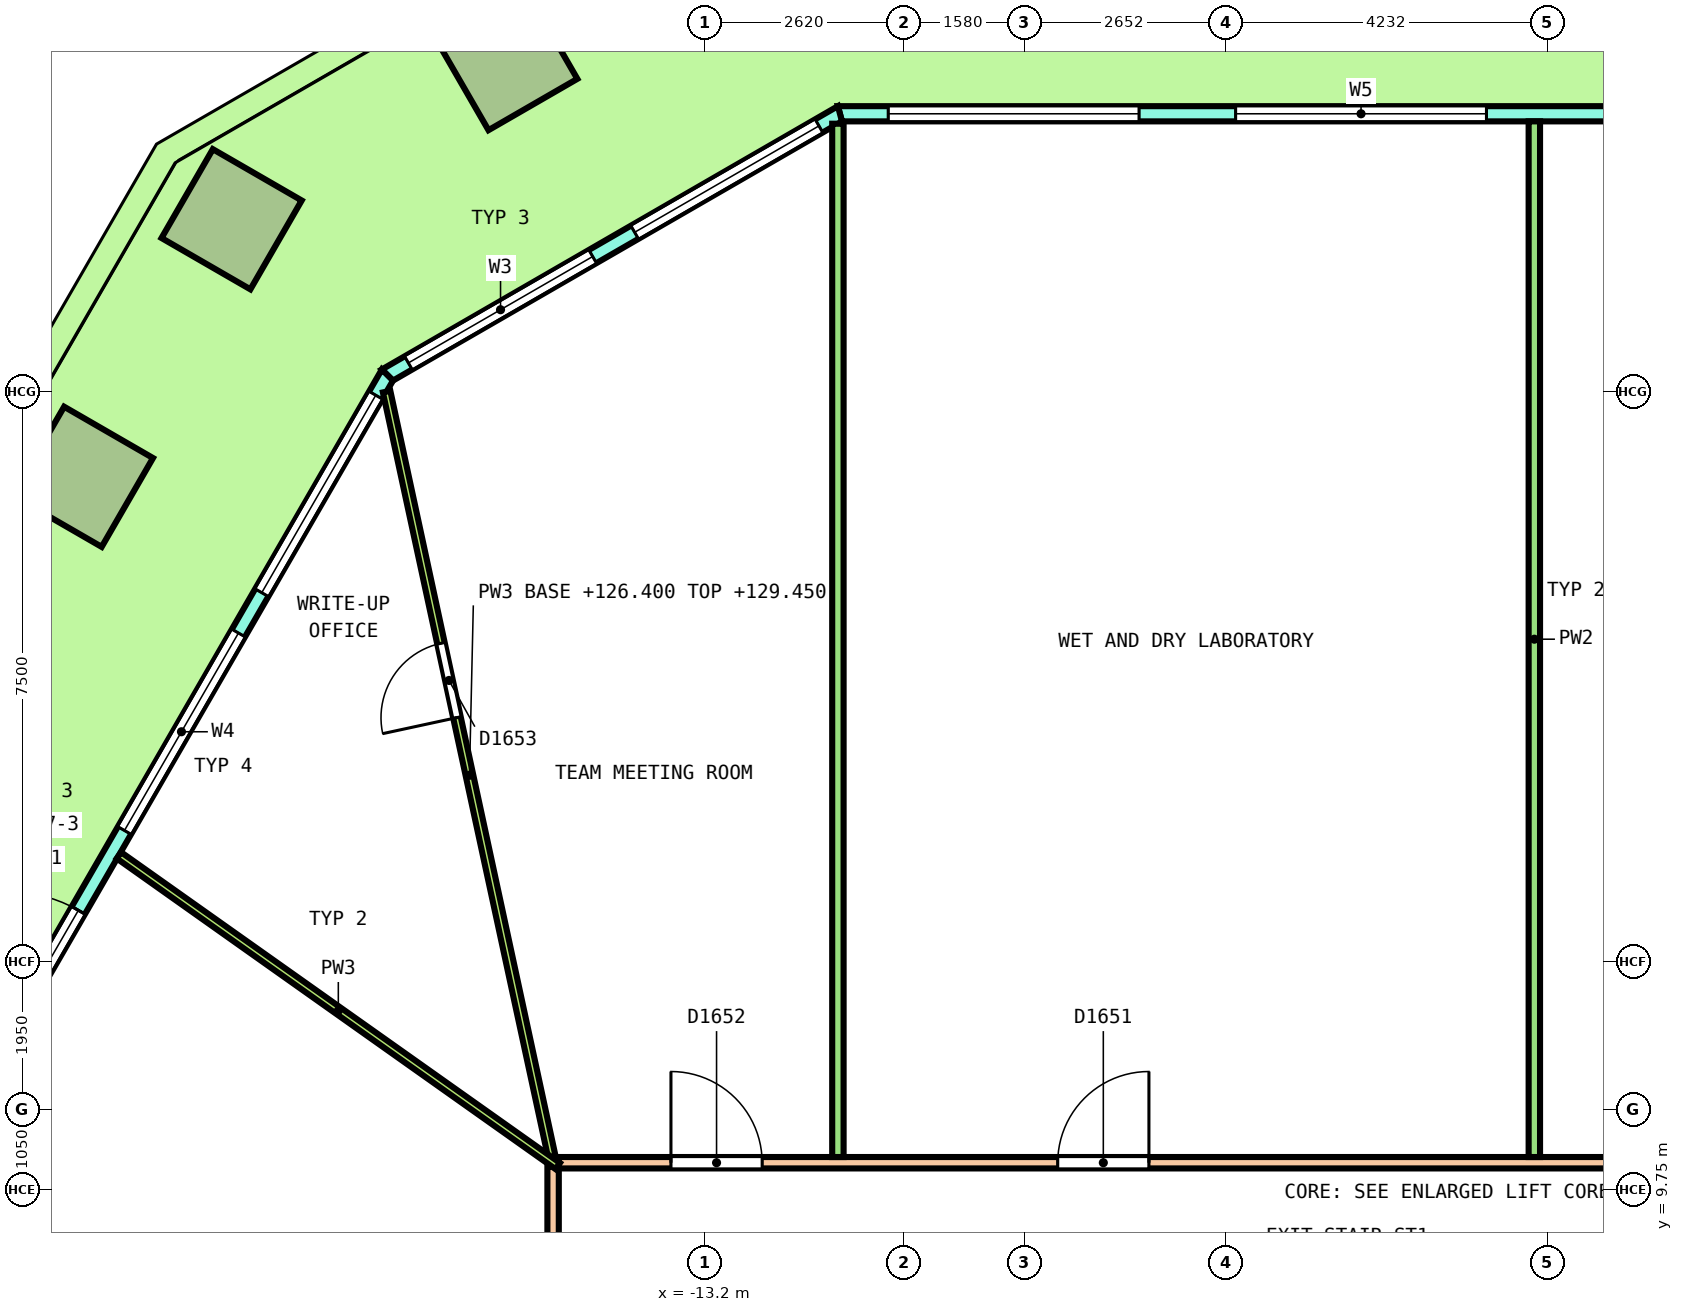
"""IFC4 building model, lengths in metres.
Left out: names, types, materials, properties, quantities, classifications, styles, units other than length and angle.
Written with IfcOpenShell. Run it as: python <this file> out.ifc"""

import sys

from ifc_helpers import new_model, si_unit, direction, frame, frame_2d, origin, origin_2d, place, context, subcontext, project, spatial, polyline, rectangle, outline, extrude, element, fill, save


model = new_model("IFC4")
c1 = context("Model", 3, precision=1e-05, world=origin(), true_north=direction((0.0, 1.0)))
c2 = subcontext(c1, "Body", "Model", "MODEL_VIEW")
j1 = project(units=[si_unit("LENGTHUNIT", "METRE"), si_unit("PLANEANGLEUNIT", "RADIAN")], contexts=[c1])
p1 = place(None, origin())
s1 = spatial("IfcSite", under=j1, at=p1, CompositionType="ELEMENT")
p2 = place(p1, origin())
s2 = spatial("IfcBuilding", under=s1, at=p2, CompositionType="ELEMENT")
p3 = place(p2, frame((0.0, 0.0, 126.4)))
s3 = spatial("IfcBuildingStorey", under=s2, at=p3, CompositionType="ELEMENT", Elevation=126.4)
for number, where, z_axis, x_axis in (
    (1, (-15.803, 24.606, 0.0), (0.0, 0.0, 1.0), (-0.866, -0.5, 0.0)),
    (2, (-19.43, 22.512, 0.0), (0.0, 0.0, 1.0), (-0.5, -0.866, 0.0)),
    (3, (-21.386, 19.124, 0.0), (0.0, 0.0, 1.0), (-0.5, -0.866, 0.0)),
):
    element("IfcColumn", number, at=place(p3, frame(where, z_axis=z_axis, x_axis=x_axis)), inside=s3, PredefinedType="COLUMN", context=c2, shape_type="SweptSolid", body=[
        extrude(rectangle(XDim=1.35, YDim=1.35, at=origin_2d()), origin(), (0.0, 0.0, 1.0), 4.05),
    ])
p4 = place(p3, frame((11.426, 23.9, 0.0), z_axis=(0.0, 0.0, 1.0), x_axis=(-1.0, 0.0, 0.0)))
e4 = element("IfcWall", 4, at=p4, inside=s3, PredefinedType="SOLIDWALL", context=c2, shape_type="SweptSolid", body=[
    extrude(outline(polyline([(-0.027, -0.1), (1.014, -0.1), (2.055, -0.1), (3.097, -0.1), (4.138, -0.1), (5.179, -0.1), (6.22, -0.1), (7.261, -0.1), (8.303, -0.1), (9.344, -0.1), (10.385, -0.1), (11.426, -0.1), (12.468, -0.1), (13.509, -0.1), (14.55, -0.1), (15.591, -0.1), (16.632, -0.1), (17.673, -0.1), (18.715, -0.1), (19.756, -0.1), (20.797, -0.1), (21.838, -0.1), (22.879, -0.1), (22.826, 0.1), (21.789, 0.1), (20.753, 0.1), (19.717, 0.1), (18.68, 0.1), (17.644, 0.1), (16.608, 0.1), (15.572, 0.1), (14.535, 0.1), (13.499, 0.1), (12.463, 0.1), (11.426, 0.1), (10.39, 0.1), (9.354, 0.1), (8.317, 0.1), (7.281, 0.1), (6.245, 0.1), (5.208, 0.1), (4.172, 0.1), (3.136, 0.1), (2.099, 0.1), (1.063, 0.1), (0.027, 0.1), (-0.027, -0.1)])), origin(), (0.0, 0.0, 1.0), 4.1),
])
p5 = place(p4, frame((0.635, 0.0, 0.1)))
e5 = element("IfcOpeningElement", 5, at=p5, cuts=e4, PredefinedType="OPENING", context=c2, shape_type="SweptSolid", body=[
    extrude(rectangle(XDim=3.3, YDim=2.9, at=frame_2d((1.65, 1.45))), frame((0.0, 0.11, 0.0), z_axis=(0.0, -1.0, 0.0), x_axis=(1.0, 0.0, 0.0)), (0.0, 0.0, 1.0), 0.22),
])
p6 = place(p4, frame((5.206, 0.0, 0.1)))
e6 = element("IfcOpeningElement", 6, at=p6, cuts=e4, PredefinedType="OPENING", context=c2, shape_type="SweptSolid", body=[
    extrude(rectangle(XDim=3.3, YDim=2.9, at=frame_2d((1.65, 1.45))), frame((0.0, 0.11, 0.0), z_axis=(0.0, -1.0, 0.0), x_axis=(1.0, 0.0, 0.0)), (0.0, 0.0, 1.0), 0.22),
])
p7 = place(p4, frame((10.526, 0.0, 0.0)))
e7 = element("IfcOpeningElement", 7, at=p7, cuts=e4, PredefinedType="OPENING", context=c2, shape_type="SweptSolid", body=[
    extrude(rectangle(XDim=1.8, YDim=2.4, at=frame_2d((0.9, 1.2))), frame((0.0, 0.11, 0.0), z_axis=(0.0, -1.0, 0.0), x_axis=(1.0, 0.0, 0.0)), (0.0, 0.0, 1.0), 0.22),
])
p8 = place(p4, frame((10.526, 0.0, 2.55)))
e8 = element("IfcOpeningElement", 8, at=p8, cuts=e4, PredefinedType="OPENING", context=c2, shape_type="SweptSolid", body=[
    extrude(rectangle(XDim=1.8, YDim=0.45, at=frame_2d((0.9, 0.225))), frame((0.0, 0.11, 0.0), z_axis=(0.0, -1.0, 0.0), x_axis=(1.0, 0.0, 0.0)), (0.0, 0.0, 1.0), 0.22),
])
p9 = place(p4, frame((14.347, 0.0, 0.1)))
e9 = element("IfcOpeningElement", 9, at=p9, cuts=e4, PredefinedType="OPENING", context=c2, shape_type="SweptSolid", body=[
    extrude(rectangle(XDim=3.3, YDim=2.9, at=frame_2d((1.65, 1.45))), frame((0.0, 0.11, 0.0), z_axis=(0.0, -1.0, 0.0), x_axis=(1.0, 0.0, 0.0)), (0.0, 0.0, 1.0), 0.22),
])
p10 = place(p4, frame((18.917, 0.0, 0.1)))
e10 = element("IfcOpeningElement", 10, at=p10, cuts=e4, PredefinedType="OPENING", context=c2, shape_type="SweptSolid", body=[
    extrude(rectangle(XDim=3.3, YDim=2.9, at=frame_2d((1.65, 1.45))), frame((0.0, 0.11, 0.0), z_axis=(0.0, -1.0, 0.0), x_axis=(1.0, 0.0, 0.0)), (0.0, 0.0, 1.0), 0.22),
])
p11 = place(p3, frame((-11.426, 23.9, 0.0), z_axis=(0.0, 0.0, 1.0), x_axis=(-0.866029458321, -0.49999297727, 0.0)))
e11 = element("IfcWall", 11, at=p11, inside=s3, PredefinedType="SOLIDWALL", context=c2, shape_type="SweptSolid", body=[
    extrude(outline(polyline([(-0.027, -0.1), (1.128, -0.1), (2.282, -0.1), (3.437, -0.1), (4.592, -0.1), (5.747, -0.1), (6.901, -0.1), (6.848, 0.1), (5.711, 0.1), (4.574, 0.1), (3.437, 0.1), (2.301, 0.1), (1.164, 0.1), (0.027, 0.1), (-0.027, -0.1)])), origin(), (0.0, 0.0, 1.0), 4.1),
])
p12 = place(p11, frame((0.319, 0.0, 0.1)))
e12 = element("IfcOpeningElement", 12, at=p12, cuts=e11, PredefinedType="OPENING", context=c2, shape_type="SweptSolid", body=[
    extrude(rectangle(XDim=2.8, YDim=2.9, at=frame_2d((1.4, 1.45))), frame((0.0, 0.11, 0.0), z_axis=(0.0, -1.0, 0.0), x_axis=(1.0, 0.0, 0.0)), (0.0, 0.0, 1.0), 0.22),
])
p13 = place(p11, frame((3.756, 0.0, 0.1)))
e13 = element("IfcOpeningElement", 13, at=p13, cuts=e11, PredefinedType="OPENING", context=c2, shape_type="SweptSolid", body=[
    extrude(rectangle(XDim=2.8, YDim=2.9, at=frame_2d((1.4, 1.45))), frame((0.0, 0.11, 0.0), z_axis=(0.0, -1.0, 0.0), x_axis=(1.0, 0.0, 0.0)), (0.0, 0.0, 1.0), 0.22),
])
p14 = place(p3, frame((-17.38, 20.463, 0.0), z_axis=(0.0, 0.0, 1.0), x_axis=(-0.500000137386, -0.866025324465, 0.0)))
e14 = element("IfcWall", 14, at=p14, inside=s3, PredefinedType="SOLIDWALL", context=c2, shape_type="SweptSolid", body=[
    extrude(outline(polyline([(-0.027, -0.1), (0.979, -0.1), (1.986, -0.1), (2.992, -0.1), (3.999, -0.1), (5.005, -0.1), (6.012, -0.1), (7.018, -0.1), (8.025, -0.1), (9.031, -0.1), (10.038, -0.1), (11.044, -0.1), (12.051, -0.1), (13.057, -0.1), (14.063, -0.1), (15.07, -0.1), (16.076, -0.1), (17.083, -0.1), (18.089, -0.1), (18.036, 0.1), (17.035, 0.1), (16.035, 0.1), (15.034, 0.1), (14.034, 0.1), (13.033, 0.1), (12.033, 0.1), (11.032, 0.1), (10.032, 0.1), (9.031, 0.1), (8.031, 0.1), (7.03, 0.1), (6.03, 0.1), (5.029, 0.1), (4.029, 0.1), (3.028, 0.1), (2.028, 0.1), (1.027, 0.1), (0.027, 0.1), (-0.027, -0.1)])), origin(), (0.0, 0.0, 1.0), 4.1),
])
p15 = place(p14, frame((0.306, 0.0, 0.1)))
e15 = element("IfcOpeningElement", 15, at=p15, cuts=e14, PredefinedType="OPENING", context=c2, shape_type="SweptSolid", body=[
    extrude(rectangle(XDim=3.0, YDim=2.9, at=frame_2d((1.5, 1.45))), frame((0.0, 0.11, 0.0), z_axis=(0.0, -1.0, 0.0), x_axis=(1.0, 0.0, 0.0)), (0.0, 0.0, 1.0), 0.22),
])
p16 = place(p14, frame((3.919, 0.0, 0.1)))
e16 = element("IfcOpeningElement", 16, at=p16, cuts=e14, PredefinedType="OPENING", context=c2, shape_type="SweptSolid", body=[
    extrude(rectangle(XDim=3.0, YDim=2.9, at=frame_2d((1.5, 1.45))), frame((0.0, 0.11, 0.0), z_axis=(0.0, -1.0, 0.0), x_axis=(1.0, 0.0, 0.0)), (0.0, 0.0, 1.0), 0.22),
])
p17 = place(p14, frame((8.131, 0.0, 0.0)))
e17 = element("IfcOpeningElement", 17, at=p17, cuts=e14, PredefinedType="OPENING", context=c2, shape_type="SweptSolid", body=[
    extrude(rectangle(XDim=1.8, YDim=2.4, at=frame_2d((0.9, 1.2))), frame((0.0, 0.11, 0.0), z_axis=(0.0, -1.0, 0.0), x_axis=(1.0, 0.0, 0.0)), (0.0, 0.0, 1.0), 0.22),
])
p18 = place(p14, frame((8.131, 0.0, 2.55)))
e18 = element("IfcOpeningElement", 18, at=p18, cuts=e14, PredefinedType="OPENING", context=c2, shape_type="SweptSolid", body=[
    extrude(rectangle(XDim=1.8, YDim=0.45, at=frame_2d((0.9, 0.225))), frame((0.0, 0.11, 0.0), z_axis=(0.0, -1.0, 0.0), x_axis=(1.0, 0.0, 0.0)), (0.0, 0.0, 1.0), 0.22),
])
p19 = place(p14, frame((11.144, 0.0, 0.1)))
e19 = element("IfcOpeningElement", 19, at=p19, cuts=e14, PredefinedType="OPENING", context=c2, shape_type="SweptSolid", body=[
    extrude(rectangle(XDim=3.0, YDim=2.9, at=frame_2d((1.5, 1.45))), frame((0.0, 0.11, 0.0), z_axis=(0.0, -1.0, 0.0), x_axis=(1.0, 0.0, 0.0)), (0.0, 0.0, 1.0), 0.22),
])
p20 = place(p14, frame((14.756, 0.0, 0.1)))
e20 = element("IfcOpeningElement", 20, at=p20, cuts=e14, PredefinedType="OPENING", context=c2, shape_type="SweptSolid", body=[
    extrude(rectangle(XDim=3.0, YDim=2.9, at=frame_2d((1.5, 1.45))), frame((0.0, 0.11, 0.0), z_axis=(0.0, -1.0, 0.0), x_axis=(1.0, 0.0, 0.0)), (0.0, 0.0, 1.0), 0.22),
])
p21 = place(p3, frame((-15.125, 10.1, 0.0), z_axis=(0.0, 0.0, 1.0), x_axis=(1.0, 0.0, 0.0)))
e21 = element("IfcWall", 21, at=p21, inside=s3, PredefinedType="PARTITIONING", context=c2, shape_type="SweptSolid", body=[
    extrude(rectangle(XDim=30.25, YDim=0.15, at=frame_2d((15.125, 0.0))), origin(), (0.0, 0.0, 1.0), 3.05),
])
p22 = place(p21, frame((16.895, 0.0, 0.0)))
e22 = element("IfcOpeningElement", 22, at=p22, cuts=e21, PredefinedType="OPENING", context=c2, shape_type="SweptSolid", body=[
    extrude(rectangle(XDim=1.2, YDim=2.1, at=frame_2d((0.6, 1.05))), frame((0.0, 0.085, 0.0), z_axis=(0.0, -1.0, 0.0), x_axis=(1.0, 0.0, 0.0)), (0.0, 0.0, 1.0), 0.17),
])
p23 = place(p21, frame((6.564, 0.0, 0.0)))
e23 = element("IfcOpeningElement", 23, at=p23, cuts=e21, PredefinedType="OPENING", context=c2, shape_type="SweptSolid", body=[
    extrude(rectangle(XDim=1.2, YDim=2.1, at=frame_2d((0.6, 1.05))), frame((0.0, 0.085, 0.0), z_axis=(0.0, -1.0, 0.0), x_axis=(1.0, 0.0, 0.0)), (0.0, 0.0, 1.0), 0.17),
])
p24 = place(p21, frame((1.476, 0.0, 0.0)))
e24 = element("IfcOpeningElement", 24, at=p24, cuts=e21, PredefinedType="OPENING", context=c2, shape_type="SweptSolid", body=[
    extrude(rectangle(XDim=1.2, YDim=2.1, at=frame_2d((0.6, 1.05))), frame((0.0, 0.085, 0.0), z_axis=(0.0, -1.0, 0.0), x_axis=(1.0, 0.0, 0.0)), (0.0, 0.0, 1.0), 0.17),
])
p25 = place(p3, frame((-15.2, 0.426, 0.0), z_axis=(0.0, 0.0, 1.0), x_axis=(0.0, 1.0, 0.0)))
e25 = element("IfcWall", 25, at=p25, inside=s3, PredefinedType="PARTITIONING", context=c2, shape_type="SweptSolid", body=[
    extrude(rectangle(XDim=9.624, YDim=0.15, at=frame_2d((4.812, 0.0))), origin(), (0.0, 0.0, 1.0), 3.05),
])
p26 = place(p25, frame((6.951, 0.0, 0.0)))
e26 = element("IfcOpeningElement", 26, at=p26, cuts=e25, PredefinedType="OPENING", context=c2, shape_type="SweptSolid", body=[
    extrude(rectangle(XDim=1.2, YDim=2.1, at=frame_2d((0.6, 1.05))), frame((0.0, 0.085, 0.0), z_axis=(0.0, -1.0, 0.0), x_axis=(1.0, 0.0, 0.0)), (0.0, 0.0, 1.0), 0.17),
])
p27 = place(p3, frame((-2.291, 10.175, 0.0), z_axis=(0.0, 0.0, 1.0), x_axis=(0.0, 1.0, 0.0)))
e27 = element("IfcWall", 27, at=p27, inside=s3, PredefinedType="PARTITIONING", context=c2, shape_type="SweptSolid", body=[
    extrude(rectangle(XDim=13.625, YDim=0.15, at=frame_2d((6.812, 0.0))), origin(), (0.0, 0.0, 1.0), 3.05),
])
p28 = place(p3, frame((-11.453, 10.175, 0.0), z_axis=(0.0, 0.0, 1.0), x_axis=(0.0, 1.0, 0.0)))
e28 = element("IfcWall", 28, at=p28, inside=s3, PredefinedType="PARTITIONING", context=c2, shape_type="SweptSolid", body=[
    extrude(rectangle(XDim=13.594, YDim=0.15, at=frame_2d((6.797, 0.0))), origin(), (0.0, 0.0, 1.0), 3.05),
])
p29 = place(p3, frame((-17.39, 20.245, 0.0), z_axis=(0.0, 0.0, 1.0), x_axis=(0.211012362952, -0.977483392535, 0.0)))
e29 = element("IfcWall", 29, at=p29, inside=s3, PredefinedType="PARTITIONING", context=c2, shape_type="SweptSolid", body=[
    extrude(rectangle(XDim=10.329, YDim=0.1, at=frame_2d((5.164, 0.0))), origin(), (0.0, 0.0, 1.0), 3.05),
])
p30 = place(p29, frame((3.387, 0.0, 0.0)))
e30 = element("IfcOpeningElement", 30, at=p30, cuts=e29, PredefinedType="OPENING", context=c2, shape_type="SweptSolid", body=[
    extrude(rectangle(XDim=1.0, YDim=2.1, at=frame_2d((0.5, 1.05))), frame((0.0, 0.06, 0.0), z_axis=(0.0, -1.0, 0.0), x_axis=(1.0, 0.0, 0.0)), (0.0, 0.0, 1.0), 0.12),
])
p31 = place(p3, frame((-20.912, 14.144, 0.0), z_axis=(0.0, 0.0, 1.0), x_axis=(0.816149265307, -0.577841134516, 0.0)))
e31 = element("IfcWall", 31, at=p31, inside=s3, PredefinedType="PARTITIONING", context=c2, shape_type="SweptSolid", body=[
    extrude(rectangle(XDim=7.074, YDim=0.1, at=frame_2d((3.537, 0.0))), origin(), (0.0, 0.0, 1.0), 3.05),
])
p32 = place(p9, origin())
e32 = element("IfcWindow", 32, at=p32, inside=s3, PartitioningType="SINGLE_PANEL", PredefinedType="WINDOW", context=c2, shape_type="SweptSolid", body=[
    extrude(rectangle(XDim=3.3, YDim=2.9, at=frame_2d((1.65, 1.45))), frame((0.0, 0.03, 0.0), z_axis=(0.0, -1.0, 0.0), x_axis=(1.0, 0.0, 0.0)), (0.0, 0.0, 1.0), 0.06),
])
fill(e9, e32)
p33 = place(p10, origin())
e33 = element("IfcWindow", 33, at=p33, inside=s3, PartitioningType="SINGLE_PANEL", PredefinedType="WINDOW", context=c2, shape_type="SweptSolid", body=[
    extrude(rectangle(XDim=3.3, YDim=2.9, at=frame_2d((1.65, 1.45))), frame((0.0, 0.03, 0.0), z_axis=(0.0, -1.0, 0.0), x_axis=(1.0, 0.0, 0.0)), (0.0, 0.0, 1.0), 0.06),
])
fill(e10, e33)
p34 = place(p12, origin())
e34 = element("IfcWindow", 34, at=p34, inside=s3, PartitioningType="SINGLE_PANEL", PredefinedType="WINDOW", context=c2, shape_type="SweptSolid", body=[
    extrude(rectangle(XDim=2.8, YDim=2.9, at=frame_2d((1.4, 1.45))), frame((0.0, 0.03, 0.0), z_axis=(0.0, -1.0, 0.0), x_axis=(1.0, 0.0, 0.0)), (0.0, 0.0, 1.0), 0.06),
])
fill(e12, e34)
p35 = place(p13, origin())
e35 = element("IfcWindow", 35, at=p35, inside=s3, PartitioningType="SINGLE_PANEL", PredefinedType="WINDOW", context=c2, shape_type="SweptSolid", body=[
    extrude(rectangle(XDim=2.8, YDim=2.9, at=frame_2d((1.4, 1.45))), frame((0.0, 0.03, 0.0), z_axis=(0.0, -1.0, 0.0), x_axis=(1.0, 0.0, 0.0)), (0.0, 0.0, 1.0), 0.06),
])
fill(e13, e35)
p36 = place(p15, origin())
e36 = element("IfcWindow", 36, at=p36, inside=s3, PartitioningType="SINGLE_PANEL", PredefinedType="WINDOW", context=c2, shape_type="SweptSolid", body=[
    extrude(rectangle(XDim=3.0, YDim=2.9, at=frame_2d((1.5, 1.45))), frame((0.0, 0.03, 0.0), z_axis=(0.0, -1.0, 0.0), x_axis=(1.0, 0.0, 0.0)), (0.0, 0.0, 1.0), 0.06),
])
fill(e15, e36)
p37 = place(p16, origin())
e37 = element("IfcWindow", 37, at=p37, inside=s3, PartitioningType="SINGLE_PANEL", PredefinedType="WINDOW", context=c2, shape_type="SweptSolid", body=[
    extrude(rectangle(XDim=3.0, YDim=2.9, at=frame_2d((1.5, 1.45))), frame((0.0, 0.03, 0.0), z_axis=(0.0, -1.0, 0.0), x_axis=(1.0, 0.0, 0.0)), (0.0, 0.0, 1.0), 0.06),
])
fill(e16, e37)
p38 = place(p17, origin())
e38 = element("IfcDoor", 38, at=p38, inside=s3, OperationType="DOUBLE_DOOR_SINGLE_SWING", PredefinedType="DOOR", context=c2, shape_type="SweptSolid", body=[
    extrude(rectangle(XDim=1.8, YDim=2.4, at=frame_2d((0.9, 1.2))), frame((0.0, 0.025, 0.0), z_axis=(0.0, -1.0, 0.0), x_axis=(1.0, 0.0, 0.0)), (0.0, 0.0, 1.0), 0.05),
])
fill(e17, e38)
p39 = place(p18, origin())
e39 = element("IfcWindow", 39, at=p39, inside=s3, PartitioningType="SINGLE_PANEL", PredefinedType="WINDOW", context=c2, shape_type="SweptSolid", body=[
    extrude(rectangle(XDim=1.8, YDim=0.45, at=frame_2d((0.9, 0.225))), frame((0.0, 0.03, 0.0), z_axis=(0.0, -1.0, 0.0), x_axis=(1.0, 0.0, 0.0)), (0.0, 0.0, 1.0), 0.06),
])
fill(e18, e39)
p40 = place(p23, origin())
e40 = element("IfcDoor", 40, at=p40, inside=s3, OperationType="DOUBLE_DOOR_SINGLE_SWING", PredefinedType="DOOR", context=c2, shape_type="SweptSolid", body=[
    extrude(rectangle(XDim=1.2, YDim=2.1, at=frame_2d((0.6, 1.05))), frame((0.0, 0.025, 0.0), z_axis=(0.0, -1.0, 0.0), x_axis=(1.0, 0.0, 0.0)), (0.0, 0.0, 1.0), 0.05),
])
fill(e23, e40)
p41 = place(p24, origin())
e41 = element("IfcDoor", 41, at=p41, inside=s3, OperationType="DOUBLE_DOOR_SINGLE_SWING", PredefinedType="DOOR", context=c2, shape_type="SweptSolid", body=[
    extrude(rectangle(XDim=1.2, YDim=2.1, at=frame_2d((0.6, 1.05))), frame((0.0, 0.025, 0.0), z_axis=(0.0, -1.0, 0.0), x_axis=(1.0, 0.0, 0.0)), (0.0, 0.0, 1.0), 0.05),
])
fill(e24, e41)
p42 = place(p30, origin())
e42 = element("IfcDoor", 42, at=p42, inside=s3, OperationType="SINGLE_SWING_RIGHT", PredefinedType="DOOR", context=c2, shape_type="SweptSolid", body=[
    extrude(rectangle(XDim=1.0, YDim=2.1, at=frame_2d((0.5, 1.05))), frame((0.0, 0.025, 0.0), z_axis=(0.0, -1.0, 0.0), x_axis=(1.0, 0.0, 0.0)), (0.0, 0.0, 1.0), 0.05),
])
fill(e30, e42)
save(model, sys.argv[1])
